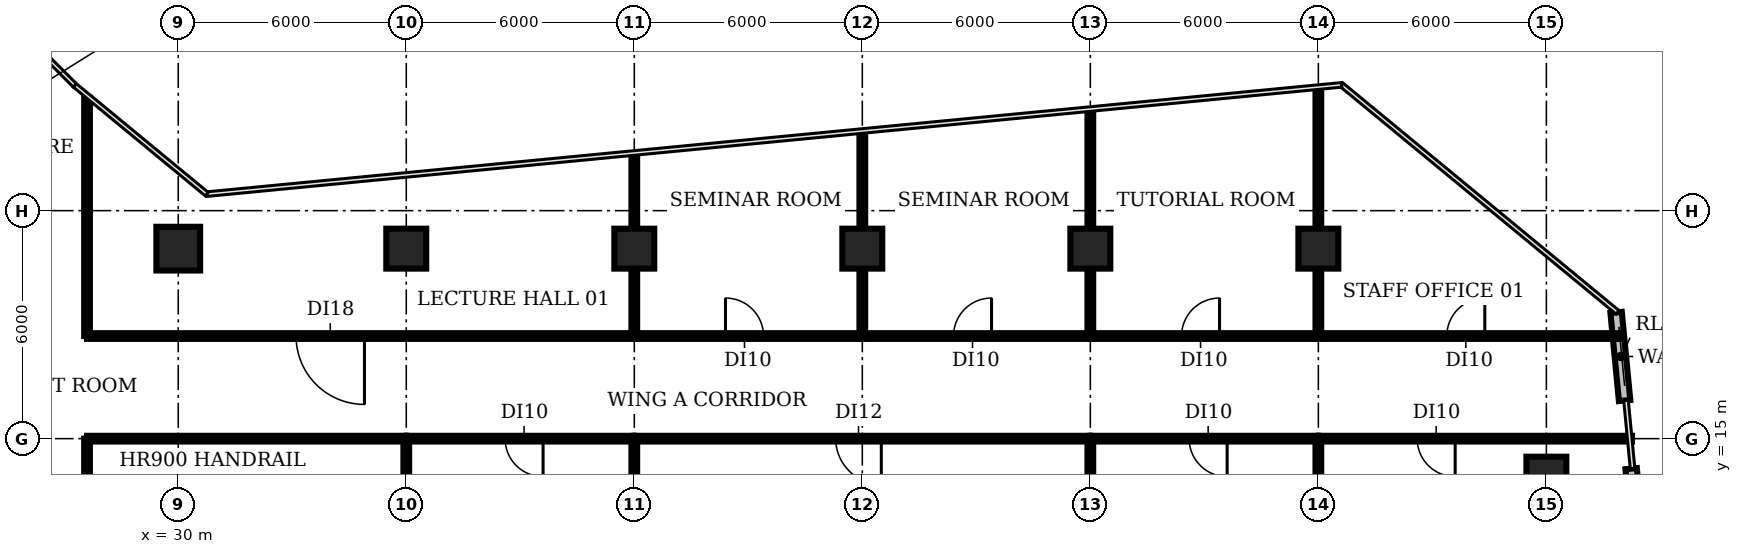
"""IFC4 building model, lengths in metres.
Left out: names, types, materials, properties, quantities, classifications, styles, units other than length and angle.
Written with IfcOpenShell. Run it as: python <this file> out.ifc"""

import sys

from ifc_helpers import new_model, si_unit, direction, frame, frame_2d, origin, origin_2d, place, context, subcontext, project, spatial, rectangle, circle, extrude, element, fill, save


model = new_model("IFC4")
c1 = context("Model", 3, precision=1e-05, world=origin(), true_north=direction((0.0, 1.0)))
c2 = subcontext(c1, "Body", "Model", "MODEL_VIEW")
j1 = project(units=[si_unit("LENGTHUNIT", "METRE"), si_unit("PLANEANGLEUNIT", "RADIAN")], contexts=[c1])
p1 = place(None, origin())
s1 = spatial("IfcSite", under=j1, at=p1, CompositionType="ELEMENT")
p2 = place(p1, origin())
s2 = spatial("IfcBuilding", under=s1, at=p2, CompositionType="ELEMENT")
p3 = place(p2, frame((0.0, 0.0, 75.2)))
s3 = spatial("IfcBuildingStorey", under=s2, at=p3, CompositionType="ELEMENT", Elevation=75.2)
p4 = place(p3, frame((30.0, 20.0, 0.0), z_axis=(0.0, 0.0, 1.0), x_axis=(1.0, 0.0, 0.0)))
e1 = element("IfcColumn", 1, at=p4, inside=s3, PredefinedType="COLUMN", context=c2, shape_type="SweptSolid", body=[
    extrude(circle(Radius=0.575, at=origin_2d()), origin(), (0.0, 0.0, 1.0), 3.2),
])
for number, where, z_axis, x_axis in (
    (2, (36.0, 20.0, 0.0), (0.0, 0.0, 1.0), (1.0, 0.0, 0.0)),
    (3, (42.0, 20.0, 0.0), (0.0, 0.0, 1.0), (1.0, 0.0, 0.0)),
    (4, (48.0, 20.0, 0.0), (0.0, 0.0, 1.0), (1.0, 0.0, 0.0)),
    (5, (54.0, 20.0, 0.0), (0.0, 0.0, 1.0), (1.0, 0.0, 0.0)),
):
    element("IfcColumn", number, at=place(p3, frame(where, z_axis=z_axis, x_axis=x_axis)), inside=s3, PredefinedType="COLUMN", context=c2, shape_type="SweptSolid", body=[
        extrude(rectangle(XDim=1.05, YDim=1.05, at=origin_2d()), origin(), (0.0, 0.0, 1.0), 3.2),
    ])
for number, where, z_axis, x_axis in (
    (6, (60.0, 20.0, 0.0), (0.0, 0.0, 1.0), (1.0, 0.0, 0.0)),
    (7, (66.0, 14.0, 0.0), (0.0, 0.0, 1.0), (1.0, 0.0, 0.0)),
):
    element("IfcColumn", number, at=place(p3, frame(where, z_axis=z_axis, x_axis=x_axis)), inside=s3, PredefinedType="COLUMN", context=c2, shape_type="SweptSolid", body=[
        extrude(circle(Radius=0.525, at=origin_2d()), origin(), (0.0, 0.0, 1.0), 3.8),
    ])
p5 = place(p3, frame((69.073, 5.459, 0.0), z_axis=(0.0, 0.0, 1.0), x_axis=(-0.095854735149, 0.995395333397, 0.0)))
e8 = element("IfcWall", 8, at=p5, inside=s3, PredefinedType="SOLIDWALL", context=c2, shape_type="SweptSolid", body=[
    extrude(rectangle(XDim=8.792, YDim=0.3, at=frame_2d((4.396, 0.0))), origin(), (0.0, 0.0, 1.0), 3.8),
])
p6 = place(p3, frame((68.058, 16.002, 0.0), z_axis=(0.0, 0.0, 1.0), x_axis=(-0.095852132121, 0.995395584061, 0.0)))
e9 = element("IfcWall", 9, at=p6, inside=s3, PredefinedType="SOLIDWALL", context=c2, shape_type="SweptSolid", body=[
    extrude(rectangle(XDim=2.331, YDim=0.3, at=frame_2d((1.165, 0.0))), origin(), (0.0, 0.0, 1.0), 3.8),
])
p7 = place(p3, frame((27.6, 15.0, 0.0), z_axis=(0.0, 0.0, 1.0), x_axis=(0.0, -1.0, 0.0)))
e10 = element("IfcWall", 10, at=p7, inside=s3, PredefinedType="PARTITIONING", context=c2, shape_type="SweptSolid", body=[
    extrude(rectangle(XDim=10.5, YDim=0.15, at=frame_2d((5.25, 0.0))), origin(), (0.0, 0.0, 1.0), 2.78),
])
p8 = place(p7, frame((4.8, 0.0, 0.0)))
e11 = element("IfcOpeningElement", 11, at=p8, cuts=e10, PredefinedType="OPENING", context=c2, shape_type="SweptSolid", body=[
    extrude(rectangle(XDim=1.0, YDim=2.1, at=frame_2d((0.5, 1.05))), frame((0.0, 0.085, 0.0), z_axis=(0.0, -1.0, 0.0), x_axis=(1.0, 0.0, 0.0)), (0.0, 0.0, 1.0), 0.17),
])
p9 = place(p3, frame((27.6, 15.0, 0.0), z_axis=(0.0, 0.0, 1.0), x_axis=(1.0, 0.0, 0.0)))
e12 = element("IfcWall", 12, at=p9, inside=s3, PredefinedType="PARTITIONING", context=c2, shape_type="SweptSolid", body=[
    extrude(rectangle(XDim=8.4, YDim=0.15, at=frame_2d((4.2, 0.0))), origin(), (0.0, 0.0, 1.0), 2.78),
])
p10 = place(p3, frame((27.6, 17.7, 0.0), z_axis=(0.0, 0.0, 1.0), x_axis=(0.0, 1.0, 0.0)))
e13 = element("IfcWall", 13, at=p10, inside=s3, PredefinedType="PARTITIONING", context=c2, shape_type="SweptSolid", body=[
    extrude(rectangle(XDim=6.27, YDim=0.15, at=frame_2d((3.135, 0.0))), origin(), (0.0, 0.0, 1.0), 2.78),
])
for number, where, z_axis, x_axis in (
    (14, (36.0, -5.06, 0.0), (0.0, 0.0, 1.0), (0.0, 1.0, 0.0)),
    (15, (42.0, -5.06, 0.0), (0.0, 0.0, 1.0), (0.0, 1.0, 0.0)),
):
    element("IfcWall", number, at=place(p3, frame(where, z_axis=z_axis, x_axis=x_axis)), inside=s3, PredefinedType="PARTITIONING", context=c2, shape_type="SweptSolid", body=[
        extrude(rectangle(XDim=20.06, YDim=0.15, at=frame_2d((10.03, 0.0))), origin(), (0.0, 0.0, 1.0), 2.78),
    ])
p11 = place(p3, frame((42.0, 15.0, 0.0), z_axis=(0.0, 0.0, 1.0), x_axis=(-1.0, 0.0, 0.0)))
e16 = element("IfcWall", 16, at=p11, inside=s3, PredefinedType="PARTITIONING", context=c2, shape_type="SweptSolid", body=[
    extrude(rectangle(XDim=6.0, YDim=0.15, at=frame_2d((3.0, 0.0))), origin(), (0.0, 0.0, 1.0), 2.78),
])
p12 = place(p11, frame((2.4, 0.0, 0.0)))
e17 = element("IfcOpeningElement", 17, at=p12, cuts=e16, PredefinedType="OPENING", context=c2, shape_type="SweptSolid", body=[
    extrude(rectangle(XDim=1.0, YDim=2.1, at=frame_2d((0.5, 1.05))), frame((0.0, 0.085, 0.0), z_axis=(0.0, -1.0, 0.0), x_axis=(1.0, 0.0, 0.0)), (0.0, 0.0, 1.0), 0.17),
])
p13 = place(p3, frame((42.0, 17.7, 0.0), z_axis=(0.0, 0.0, 1.0), x_axis=(-1.0, 0.0, 0.0)))
e18 = element("IfcWall", 18, at=p13, inside=s3, PredefinedType="PARTITIONING", context=c2, shape_type="SweptSolid", body=[
    extrude(rectangle(XDim=14.4, YDim=0.15, at=frame_2d((7.2, 0.0))), origin(), (0.0, 0.0, 1.0), 2.78),
])
p14 = place(p13, frame((7.1, 0.0, 0.0)))
e19 = element("IfcOpeningElement", 19, at=p14, cuts=e18, PredefinedType="OPENING", context=c2, shape_type="SweptSolid", body=[
    extrude(rectangle(XDim=1.8, YDim=2.1, at=frame_2d((0.9, 1.05))), frame((0.0, 0.085, 0.0), z_axis=(0.0, -1.0, 0.0), x_axis=(1.0, 0.0, 0.0)), (0.0, 0.0, 1.0), 0.17),
])
p15 = place(p3, frame((42.0, 17.7, 0.0), z_axis=(0.0, 0.0, 1.0), x_axis=(0.0, 1.0, 0.0)))
e20 = element("IfcWall", 20, at=p15, inside=s3, PredefinedType="PARTITIONING", context=c2, shape_type="SweptSolid", body=[
    extrude(rectangle(XDim=4.77, YDim=0.15, at=frame_2d((2.385, 0.0))), origin(), (0.0, 0.0, 1.0), 2.78),
])
p16 = place(p3, frame((42.0, 17.7, 0.0), z_axis=(0.0, 0.0, 1.0), x_axis=(1.0, 0.0, 0.0)))
e21 = element("IfcWall", 21, at=p16, inside=s3, PredefinedType="PARTITIONING", context=c2, shape_type="SweptSolid", body=[
    extrude(rectangle(XDim=6.0, YDim=0.15, at=frame_2d((3.0, 0.0))), origin(), (0.0, 0.0, 1.0), 2.78),
])
p17 = place(p16, frame((2.4, 0.0, 0.0)))
e22 = element("IfcOpeningElement", 22, at=p17, cuts=e21, PredefinedType="OPENING", context=c2, shape_type="SweptSolid", body=[
    extrude(rectangle(XDim=1.0, YDim=2.1, at=frame_2d((0.5, 1.05))), frame((0.0, 0.085, 0.0), z_axis=(0.0, -1.0, 0.0), x_axis=(1.0, 0.0, 0.0)), (0.0, 0.0, 1.0), 0.17),
])
p18 = place(p3, frame((48.0, 17.7, 0.0), z_axis=(0.0, 0.0, 1.0), x_axis=(0.0, 1.0, 0.0)))
e23 = element("IfcWall", 23, at=p18, inside=s3, PredefinedType="PARTITIONING", context=c2, shape_type="SweptSolid", body=[
    extrude(rectangle(XDim=5.35, YDim=0.15, at=frame_2d((2.675, 0.0))), origin(), (0.0, 0.0, 1.0), 2.78),
])
p19 = place(p3, frame((48.0, 17.7, 0.0), z_axis=(0.0, 0.0, 1.0), x_axis=(1.0, 0.0, 0.0)))
e24 = element("IfcWall", 24, at=p19, inside=s3, PredefinedType="PARTITIONING", context=c2, shape_type="SweptSolid", body=[
    extrude(rectangle(XDim=6.0, YDim=0.15, at=frame_2d((3.0, 0.0))), origin(), (0.0, 0.0, 1.0), 2.78),
])
p20 = place(p19, frame((2.4, 0.0, 0.0)))
e25 = element("IfcOpeningElement", 25, at=p20, cuts=e24, PredefinedType="OPENING", context=c2, shape_type="SweptSolid", body=[
    extrude(rectangle(XDim=1.0, YDim=2.1, at=frame_2d((0.5, 1.05))), frame((0.0, 0.085, 0.0), z_axis=(0.0, -1.0, 0.0), x_axis=(1.0, 0.0, 0.0)), (0.0, 0.0, 1.0), 0.17),
])
p21 = place(p3, frame((54.0, -5.049, 0.0), z_axis=(0.0, 0.0, 1.0), x_axis=(0.0, 1.0, 0.0)))
e26 = element("IfcWall", 26, at=p21, inside=s3, PredefinedType="PARTITIONING", context=c2, shape_type="SweptSolid", body=[
    extrude(rectangle(XDim=20.049, YDim=0.15, at=frame_2d((10.024, 0.0))), origin(), (0.0, 0.0, 1.0), 2.78),
])
p22 = place(p3, frame((54.0, 15.0, 0.0), z_axis=(0.0, 0.0, 1.0), x_axis=(-1.0, 0.0, 0.0)))
e27 = element("IfcWall", 27, at=p22, inside=s3, PredefinedType="PARTITIONING", context=c2, shape_type="SweptSolid", body=[
    extrude(rectangle(XDim=12.0, YDim=0.15, at=frame_2d((6.0, 0.0))), origin(), (0.0, 0.0, 1.0), 2.78),
])
p23 = place(p22, frame((5.5, 0.0, 0.0)))
e28 = element("IfcOpeningElement", 28, at=p23, cuts=e27, PredefinedType="OPENING", context=c2, shape_type="SweptSolid", body=[
    extrude(rectangle(XDim=1.2, YDim=2.1, at=frame_2d((0.6, 1.05))), frame((0.0, 0.085, 0.0), z_axis=(0.0, -1.0, 0.0), x_axis=(1.0, 0.0, 0.0)), (0.0, 0.0, 1.0), 0.17),
])
p24 = place(p3, frame((54.0, 17.7, 0.0), z_axis=(0.0, 0.0, 1.0), x_axis=(0.0, 1.0, 0.0)))
e29 = element("IfcWall", 29, at=p24, inside=s3, PredefinedType="PARTITIONING", context=c2, shape_type="SweptSolid", body=[
    extrude(rectangle(XDim=5.92, YDim=0.15, at=frame_2d((2.96, 0.0))), origin(), (0.0, 0.0, 1.0), 2.78),
])
p25 = place(p3, frame((54.0, 17.7, 0.0), z_axis=(0.0, 0.0, 1.0), x_axis=(1.0, 0.0, 0.0)))
e30 = element("IfcWall", 30, at=p25, inside=s3, PredefinedType="PARTITIONING", context=c2, shape_type="SweptSolid", body=[
    extrude(rectangle(XDim=6.0, YDim=0.15, at=frame_2d((3.0, 0.0))), origin(), (0.0, 0.0, 1.0), 2.78),
])
p26 = place(p25, frame((2.4, 0.0, 0.0)))
e31 = element("IfcOpeningElement", 31, at=p26, cuts=e30, PredefinedType="OPENING", context=c2, shape_type="SweptSolid", body=[
    extrude(rectangle(XDim=1.0, YDim=2.1, at=frame_2d((0.5, 1.05))), frame((0.0, 0.085, 0.0), z_axis=(0.0, -1.0, 0.0), x_axis=(1.0, 0.0, 0.0)), (0.0, 0.0, 1.0), 0.17),
])
p27 = place(p3, frame((60.0, -5.06, 0.0), z_axis=(0.0, 0.0, 1.0), x_axis=(0.0, 1.0, 0.0)))
e32 = element("IfcWall", 32, at=p27, inside=s3, PredefinedType="PARTITIONING", context=c2, shape_type="SweptSolid", body=[
    extrude(rectangle(XDim=20.06, YDim=0.15, at=frame_2d((10.03, 0.0))), origin(), (0.0, 0.0, 1.0), 2.78),
])
p28 = place(p3, frame((60.0, 15.0, 0.0), z_axis=(0.0, 0.0, 1.0), x_axis=(-1.0, 0.0, 0.0)))
e33 = element("IfcWall", 33, at=p28, inside=s3, PredefinedType="PARTITIONING", context=c2, shape_type="SweptSolid", body=[
    extrude(rectangle(XDim=6.0, YDim=0.15, at=frame_2d((3.0, 0.0))), origin(), (0.0, 0.0, 1.0), 2.78),
])
p29 = place(p28, frame((2.4, 0.0, 0.0)))
e34 = element("IfcOpeningElement", 34, at=p29, cuts=e33, PredefinedType="OPENING", context=c2, shape_type="SweptSolid", body=[
    extrude(rectangle(XDim=1.0, YDim=2.1, at=frame_2d((0.5, 1.05))), frame((0.0, 0.085, 0.0), z_axis=(0.0, -1.0, 0.0), x_axis=(1.0, 0.0, 0.0)), (0.0, 0.0, 1.0), 0.17),
])
p30 = place(p3, frame((60.0, 17.7, 0.0), z_axis=(0.0, 0.0, 1.0), x_axis=(0.0, 1.0, 0.0)))
e35 = element("IfcWall", 35, at=p30, inside=s3, PredefinedType="PARTITIONING", context=c2, shape_type="SweptSolid", body=[
    extrude(rectangle(XDim=6.5, YDim=0.15, at=frame_2d((3.25, 0.0))), origin(), (0.0, 0.0, 1.0), 2.78),
])
p31 = place(p3, frame((60.0, 17.7, 0.0), z_axis=(0.0, 0.0, 1.0), x_axis=(1.0, 0.0, 0.0)))
e36 = element("IfcWall", 36, at=p31, inside=s3, PredefinedType="PARTITIONING", context=c2, shape_type="SweptSolid", body=[
    extrude(rectangle(XDim=7.993, YDim=0.15, at=frame_2d((3.996, 0.0))), origin(), (0.0, 0.0, 1.0), 2.78),
])
p32 = place(p31, frame((3.38, 0.0, 0.0)))
e37 = element("IfcOpeningElement", 37, at=p32, cuts=e36, PredefinedType="OPENING", context=c2, shape_type="SweptSolid", body=[
    extrude(rectangle(XDim=1.0, YDim=2.1, at=frame_2d((0.5, 1.05))), frame((0.0, 0.085, 0.0), z_axis=(0.0, -1.0, 0.0), x_axis=(1.0, 0.0, 0.0)), (0.0, 0.0, 1.0), 0.17),
])
p33 = place(p3, frame((68.253, 15.0, 0.0), z_axis=(0.0, 0.0, 1.0), x_axis=(-1.0, 0.0, 0.0)))
e38 = element("IfcWall", 38, at=p33, inside=s3, PredefinedType="PARTITIONING", context=c2, shape_type="SweptSolid", body=[
    extrude(rectangle(XDim=8.253, YDim=0.15, at=frame_2d((4.126, 0.0))), origin(), (0.0, 0.0, 1.0), 2.78),
])
p34 = place(p33, frame((4.653, 0.0, 0.0)))
e39 = element("IfcOpeningElement", 39, at=p34, cuts=e38, PredefinedType="OPENING", context=c2, shape_type="SweptSolid", body=[
    extrude(rectangle(XDim=1.0, YDim=2.1, at=frame_2d((0.5, 1.05))), frame((0.0, 0.085, 0.0), z_axis=(0.0, -1.0, 0.0), x_axis=(1.0, 0.0, 0.0)), (0.0, 0.0, 1.0), 0.17),
])
p35 = place(p12, origin())
e40 = element("IfcDoor", 40, at=p35, inside=s3, OperationType="SINGLE_SWING_LEFT", PredefinedType="DOOR", context=c2, shape_type="SweptSolid", body=[
    extrude(rectangle(XDim=1.0, YDim=2.1, at=frame_2d((0.5, 1.05))), frame((0.0, 0.025, 0.0), z_axis=(0.0, -1.0, 0.0), x_axis=(1.0, 0.0, 0.0)), (0.0, 0.0, 1.0), 0.05),
])
fill(e17, e40)
p36 = place(p14, origin())
e41 = element("IfcDoor", 41, at=p36, inside=s3, OperationType="SINGLE_SWING_LEFT", PredefinedType="DOOR", context=c2, shape_type="SweptSolid", body=[
    extrude(rectangle(XDim=1.8, YDim=2.1, at=frame_2d((0.9, 1.05))), frame((0.0, 0.025, 0.0), z_axis=(0.0, -1.0, 0.0), x_axis=(1.0, 0.0, 0.0)), (0.0, 0.0, 1.0), 0.05),
])
fill(e19, e41)
p37 = place(p17, origin())
e42 = element("IfcDoor", 42, at=p37, inside=s3, OperationType="SINGLE_SWING_LEFT", PredefinedType="DOOR", context=c2, shape_type="SweptSolid", body=[
    extrude(rectangle(XDim=1.0, YDim=2.1, at=frame_2d((0.5, 1.05))), frame((0.0, 0.025, 0.0), z_axis=(0.0, -1.0, 0.0), x_axis=(1.0, 0.0, 0.0)), (0.0, 0.0, 1.0), 0.05),
])
fill(e22, e42)
p38 = place(p20, origin())
e43 = element("IfcDoor", 43, at=p38, inside=s3, OperationType="SINGLE_SWING_RIGHT", PredefinedType="DOOR", context=c2, shape_type="SweptSolid", body=[
    extrude(rectangle(XDim=1.0, YDim=2.1, at=frame_2d((0.5, 1.05))), frame((0.0, 0.025, 0.0), z_axis=(0.0, -1.0, 0.0), x_axis=(1.0, 0.0, 0.0)), (0.0, 0.0, 1.0), 0.05),
])
fill(e25, e43)
p39 = place(p23, origin())
e44 = element("IfcDoor", 44, at=p39, inside=s3, OperationType="SINGLE_SWING_LEFT", PredefinedType="DOOR", context=c2, shape_type="SweptSolid", body=[
    extrude(rectangle(XDim=1.2, YDim=2.1, at=frame_2d((0.6, 1.05))), frame((0.0, 0.025, 0.0), z_axis=(0.0, -1.0, 0.0), x_axis=(1.0, 0.0, 0.0)), (0.0, 0.0, 1.0), 0.05),
])
fill(e28, e44)
p40 = place(p26, origin())
e45 = element("IfcDoor", 45, at=p40, inside=s3, OperationType="SINGLE_SWING_RIGHT", PredefinedType="DOOR", context=c2, shape_type="SweptSolid", body=[
    extrude(rectangle(XDim=1.0, YDim=2.1, at=frame_2d((0.5, 1.05))), frame((0.0, 0.025, 0.0), z_axis=(0.0, -1.0, 0.0), x_axis=(1.0, 0.0, 0.0)), (0.0, 0.0, 1.0), 0.05),
])
fill(e31, e45)
p41 = place(p29, origin())
e46 = element("IfcDoor", 46, at=p41, inside=s3, OperationType="SINGLE_SWING_LEFT", PredefinedType="DOOR", context=c2, shape_type="SweptSolid", body=[
    extrude(rectangle(XDim=1.0, YDim=2.1, at=frame_2d((0.5, 1.05))), frame((0.0, 0.025, 0.0), z_axis=(0.0, -1.0, 0.0), x_axis=(1.0, 0.0, 0.0)), (0.0, 0.0, 1.0), 0.05),
])
fill(e34, e46)
p42 = place(p32, origin())
e47 = element("IfcDoor", 47, at=p42, inside=s3, OperationType="SINGLE_SWING_RIGHT", PredefinedType="DOOR", context=c2, shape_type="SweptSolid", body=[
    extrude(rectangle(XDim=1.0, YDim=2.1, at=frame_2d((0.5, 1.05))), frame((0.0, 0.025, 0.0), z_axis=(0.0, -1.0, 0.0), x_axis=(1.0, 0.0, 0.0)), (0.0, 0.0, 1.0), 0.05),
])
fill(e37, e47)
p43 = place(p34, origin())
e48 = element("IfcDoor", 48, at=p43, inside=s3, OperationType="SINGLE_SWING_LEFT", PredefinedType="DOOR", context=c2, shape_type="SweptSolid", body=[
    extrude(rectangle(XDim=1.0, YDim=2.1, at=frame_2d((0.5, 1.05))), frame((0.0, 0.025, 0.0), z_axis=(0.0, -1.0, 0.0), x_axis=(1.0, 0.0, 0.0)), (0.0, 0.0, 1.0), 0.05),
])
fill(e39, e48)
save(model, sys.argv[1])
